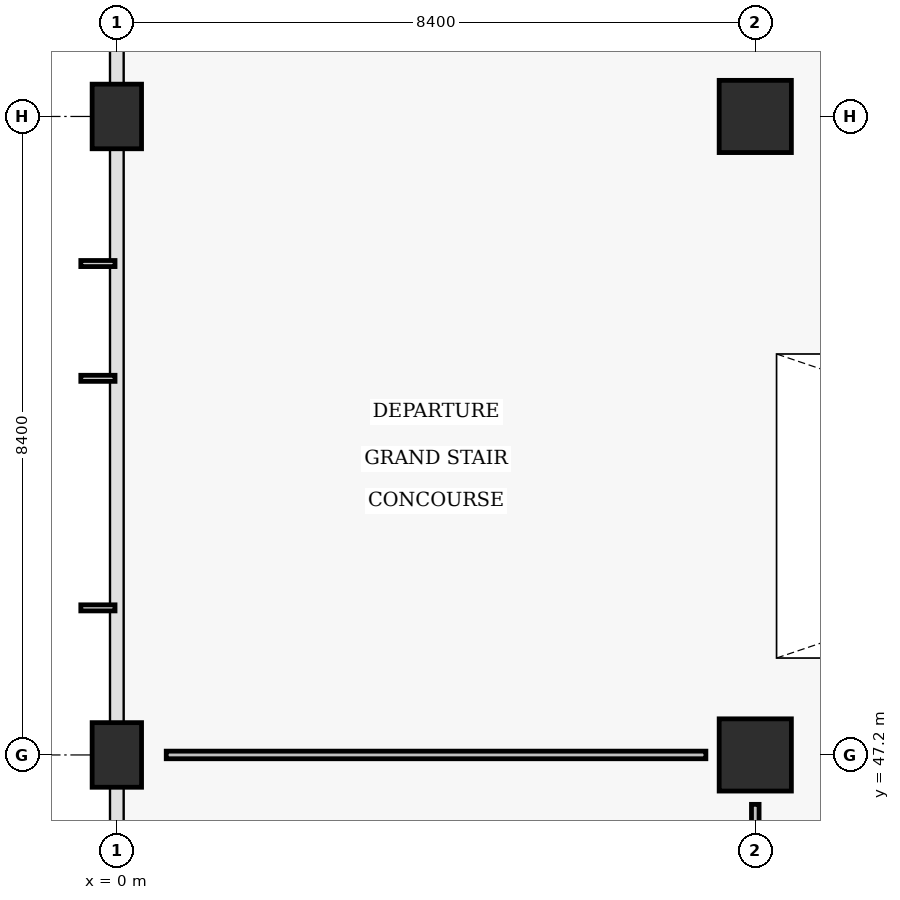
"""IFC4 building model, lengths in metres.
Left out: names, types, materials, properties, quantities, classifications, styles, units other than length and angle.
Written with IfcOpenShell. Run it as: python <this file> out.ifc"""

import sys

from ifc_helpers import new_model, si_unit, direction, frame, frame_2d, origin, origin_2d, place, context, subcontext, project, spatial, rectangle, circle, extrude, element, save


model = new_model("IFC4")
c1 = context("Model", 3, precision=1e-05, world=origin(), true_north=direction((0.0, 1.0)))
c2 = subcontext(c1, "Body", "Model", "MODEL_VIEW")
j1 = project(units=[si_unit("LENGTHUNIT", "METRE"), si_unit("PLANEANGLEUNIT", "RADIAN")], contexts=[c1])
p1 = place(None, origin())
s1 = spatial("IfcSite", under=j1, at=p1, CompositionType="ELEMENT")
p2 = place(p1, origin())
s2 = spatial("IfcBuilding", under=s1, at=p2, CompositionType="ELEMENT")
p3 = place(p2, origin())
s3 = spatial("IfcBuildingStorey", under=s2, at=p3, CompositionType="ELEMENT", Elevation=0.0)
for number, where, z_axis, x_axis in (
    (1, (0.0, 47.2, -0.46), (0.0, 0.0, 1.0), (1.0, 0.0, 0.0)),
    (2, (0.0, 55.6, -0.46), (0.0, 0.0, 1.0), (1.0, 0.0, 0.0)),
):
    element("IfcColumn", number, at=place(p3, frame(where, z_axis=z_axis, x_axis=x_axis)), inside=s3, PredefinedType="COLUMN", context=c2, shape_type="SweptSolid", body=[
        extrude(rectangle(XDim=0.65, YDim=0.85, at=origin_2d()), origin(), (0.0, 0.0, 1.0), 5.9),
    ])
for number, where, z_axis, x_axis in (
    (3, (8.4, 47.2, -0.46), (0.0, 0.0, 1.0), (1.0, 0.0, 0.0)),
    (4, (8.4, 55.6, -0.46), (0.0, 0.0, 1.0), (1.0, 0.0, 0.0)),
):
    element("IfcColumn", number, at=place(p3, frame(where, z_axis=z_axis, x_axis=x_axis)), inside=s3, PredefinedType="COLUMN", context=c2, shape_type="SweptSolid", body=[
        extrude(circle(Radius=0.475, at=origin_2d()), origin(), (0.0, 0.0, 1.0), 5.9),
    ])
p4 = place(p3, frame((0.65, 47.2, 0.0), z_axis=(0.0, 0.0, 1.0), x_axis=(1.0, 0.0, 0.0)))
e5 = element("IfcWall", 5, at=p4, inside=s3, PredefinedType="PARTITIONING", context=c2, shape_type="SweptSolid", body=[
    extrude(rectangle(XDim=7.1, YDim=0.1, at=frame_2d((3.55, 0.0))), origin(), (0.0, 0.0, 1.0), 3.0),
])
p5 = place(p3, frame((8.4, 39.45, 0.0), z_axis=(0.0, 0.0, 1.0), x_axis=(0.0, 1.0, 0.0)))
e6 = element("IfcWall", 6, at=p5, inside=s3, PredefinedType="PARTITIONING", context=c2, shape_type="SweptSolid", body=[
    extrude(rectangle(XDim=7.1, YDim=0.1, at=frame_2d((3.55, 0.0))), origin(), (0.0, 0.0, 1.0), 3.0),
])
p6 = place(p5, frame((1.5, 0.0, 0.0)))
e7 = element("IfcOpeningElement", 7, at=p6, cuts=e6, PredefinedType="OPENING", context=c2, shape_type="SweptSolid", body=[
    extrude(rectangle(XDim=0.9, YDim=2.06, at=frame_2d((0.45, 1.03))), frame((0.0, 0.06, 0.0), z_axis=(0.0, -1.0, 0.0), x_axis=(1.0, 0.0, 0.0)), (0.0, 0.0, 1.0), 0.12),
])
p7 = place(p5, frame((4.1, 0.0, 0.0)))
e8 = element("IfcOpeningElement", 8, at=p7, cuts=e6, PredefinedType="OPENING", context=c2, shape_type="SweptSolid", body=[
    extrude(rectangle(XDim=1.06, YDim=2.1, at=frame_2d((0.53, 1.05))), frame((0.0, 0.06, 0.0), z_axis=(0.0, -1.0, 0.0), x_axis=(1.0, 0.0, 0.0)), (0.0, 0.0, 1.0), 0.12),
])
save(model, sys.argv[1])
